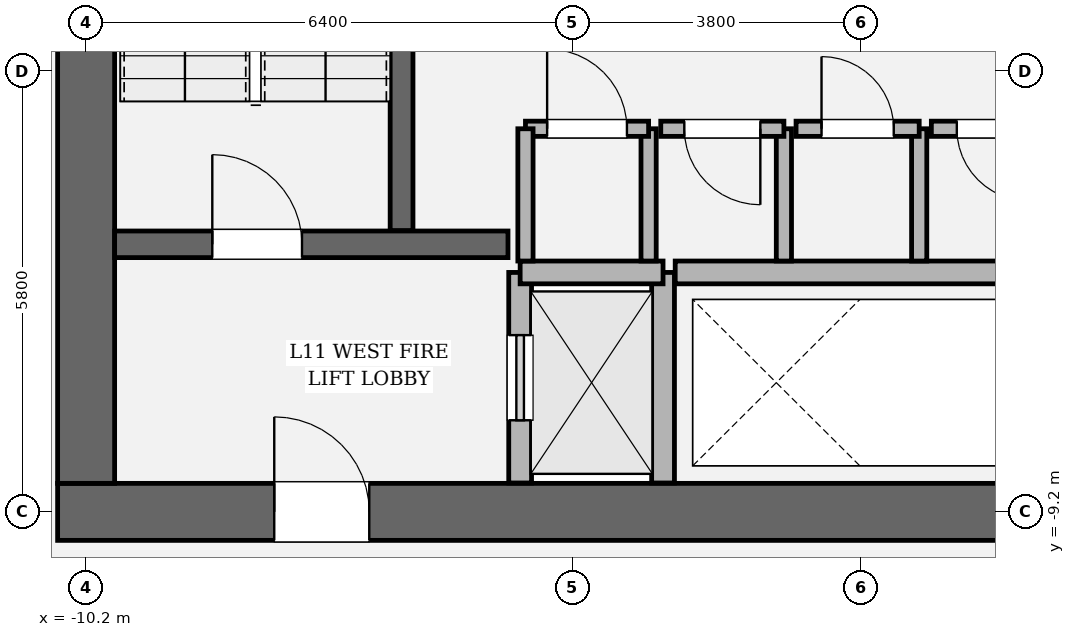
"""IFC4 building model, lengths in metres.
Left out: names, types, materials, properties, quantities, classifications, styles, units other than length and angle.
Written with IfcOpenShell. Run it as: python <this file> out.ifc"""

import sys

from ifc_helpers import new_model, si_unit, direction, frame, frame_2d, origin, place, context, subcontext, project, spatial, rectangle, extrude, element, fill, save


model = new_model("IFC4")
c1 = context("Model", 3, precision=1e-05, world=origin(), true_north=direction((0.0, 1.0)))
c2 = subcontext(c1, "Body", "Model", "MODEL_VIEW")
j1 = project(units=[si_unit("LENGTHUNIT", "METRE"), si_unit("PLANEANGLEUNIT", "RADIAN")], contexts=[c1])
p1 = place(None, origin())
s1 = spatial("IfcSite", under=j1, at=p1, CompositionType="ELEMENT")
p2 = place(p1, origin())
s2 = spatial("IfcBuilding", under=s1, at=p2, CompositionType="ELEMENT")
p3 = place(p2, frame((0.0, 0.0, 52.5)))
s3 = spatial("IfcBuildingStorey", under=s2, at=p3, CompositionType="ELEMENT", Elevation=52.5)
p4 = place(p3, frame((10.575, -9.2, 0.0), z_axis=(0.0, 0.0, 1.0), x_axis=(-1.0, 0.0, 0.0)))
e1 = element("IfcWall", 1, at=p4, inside=s3, PredefinedType="SHEAR", context=c2, shape_type="SweptSolid", body=[
    extrude(rectangle(XDim=21.15, YDim=0.75, at=frame_2d((10.575, 0.0))), origin(), (0.0, 0.0, 1.0), 4.05),
])
p5 = place(p4, frame((2.85, 0.0, 0.0)))
e2 = element("IfcOpeningElement", 2, at=p5, cuts=e1, PredefinedType="OPENING", context=c2, shape_type="SweptSolid", body=[
    extrude(rectangle(XDim=1.25, YDim=2.25, at=frame_2d((0.625, 1.125))), frame((0.0, 0.385, 0.0), z_axis=(0.0, -1.0, 0.0), x_axis=(1.0, 0.0, 0.0)), (0.0, 0.0, 1.0), 0.77),
])
p6 = place(p4, frame((17.05, 0.0, 0.0)))
e3 = element("IfcOpeningElement", 3, at=p6, cuts=e1, PredefinedType="OPENING", context=c2, shape_type="SweptSolid", body=[
    extrude(rectangle(XDim=1.25, YDim=2.25, at=frame_2d((0.625, 1.125))), frame((0.0, 0.385, 0.0), z_axis=(0.0, -1.0, 0.0), x_axis=(1.0, 0.0, 0.0)), (0.0, 0.0, 1.0), 0.77),
])
p7 = place(p3, frame((-10.2, -8.825, 0.0), z_axis=(0.0, 0.0, 1.0), x_axis=(0.0, 1.0, 0.0)))
e4 = element("IfcWall", 4, at=p7, inside=s3, PredefinedType="SHEAR", context=c2, shape_type="SweptSolid", body=[
    extrude(rectangle(XDim=17.65, YDim=0.75, at=frame_2d((8.825, 0.0))), origin(), (0.0, 0.0, 1.0), 4.05),
])
p8 = place(p7, frame((12.615, 0.0, 0.0)))
e5 = element("IfcOpeningElement", 5, at=p8, cuts=e4, PredefinedType="OPENING", context=c2, shape_type="SweptSolid", body=[
    extrude(rectangle(XDim=1.18, YDim=2.2, at=frame_2d((0.59, 1.1))), frame((0.0, 0.385, 0.0), z_axis=(0.0, -1.0, 0.0), x_axis=(1.0, 0.0, 0.0)), (0.0, 0.0, 1.0), 0.77),
])
p9 = place(p3, frame((-6.05, -5.5, 0.0), z_axis=(0.0, 0.0, 1.0), x_axis=(0.0, 1.0, 0.0)))
e6 = element("IfcWall", 6, at=p9, inside=s3, PredefinedType="SOLIDWALL", context=c2, shape_type="SweptSolid", body=[
    extrude(rectangle(XDim=8.95, YDim=0.3, at=frame_2d((4.475, 0.0))), origin(), (0.0, 0.0, 1.0), 4.05),
])
p10 = place(p3, frame((-9.825, -5.68, 0.0), z_axis=(0.0, 0.0, 1.0), x_axis=(1.0, 0.0, 0.0)))
e7 = element("IfcWall", 7, at=p10, inside=s3, PredefinedType="SOLIDWALL", context=c2, shape_type="SweptSolid", body=[
    extrude(rectangle(XDim=5.175, YDim=0.35, at=frame_2d((2.587, 0.0))), origin(), (0.0, 0.0, 1.0), 4.05),
])
p11 = place(p10, frame((1.285, 0.0, 0.0)))
e8 = element("IfcOpeningElement", 8, at=p11, cuts=e7, PredefinedType="OPENING", context=c2, shape_type="SweptSolid", body=[
    extrude(rectangle(XDim=1.18, YDim=2.2, at=frame_2d((0.59, 1.1))), frame((0.0, 0.185, 0.0), z_axis=(0.0, -1.0, 0.0), x_axis=(1.0, 0.0, 0.0)), (0.0, 0.0, 1.0), 0.37),
])
p12 = place(p3, frame((-4.49, -8.82, 0.0), z_axis=(0.0, 0.0, 1.0), x_axis=(0.0, 1.0, 0.0)))
e9 = element("IfcWall", 9, at=p12, inside=s3, PredefinedType="SOLIDWALL", context=c2, shape_type="SweptSolid", body=[
    extrude(rectangle(XDim=2.77, YDim=0.3, at=frame_2d((1.385, 0.0))), origin(), (0.0, 0.0, 1.0), 3.81),
])
p13 = place(p12, frame((0.825, 0.0, 0.0)))
e10 = element("IfcOpeningElement", 10, at=p13, cuts=e9, PredefinedType="OPENING", context=c2, shape_type="SweptSolid", body=[
    extrude(rectangle(XDim=1.12, YDim=2.25, at=frame_2d((0.56, 1.125))), frame((0.0, 0.16, 0.0), z_axis=(0.0, -1.0, 0.0), x_axis=(1.0, 0.0, 0.0)), (0.0, 0.0, 1.0), 0.32),
])
p14 = place(p3, frame((-2.61, -8.82, 0.0), z_axis=(0.0, 0.0, 1.0), x_axis=(0.0, 1.0, 0.0)))
e11 = element("IfcWall", 11, at=p14, inside=s3, PredefinedType="SOLIDWALL", context=c2, shape_type="SweptSolid", body=[
    extrude(rectangle(XDim=2.77, YDim=0.3, at=frame_2d((1.385, 0.0))), origin(), (0.0, 0.0, 1.0), 3.81),
])
p15 = place(p3, frame((-4.49, -6.05, 0.0), z_axis=(0.0, 0.0, 1.0), x_axis=(1.0, 0.0, 0.0)))
e12 = element("IfcWall", 12, at=p15, inside=s3, PredefinedType="SOLIDWALL", context=c2, shape_type="SweptSolid", body=[
    extrude(rectangle(XDim=1.88, YDim=0.3, at=frame_2d((0.94, 0.0))), origin(), (0.0, 0.0, 1.0), 3.81),
])
p16 = place(p3, frame((-2.45, -6.05, 0.0), z_axis=(0.0, 0.0, 1.0), x_axis=(1.0, 0.0, 0.0)))
e13 = element("IfcWall", 13, at=p16, inside=s3, PredefinedType="SOLIDWALL", context=c2, shape_type="SweptSolid", body=[
    extrude(rectangle(XDim=4.9, YDim=0.3, at=frame_2d((2.45, 0.0))), origin(), (0.0, 0.0, 1.0), 3.81),
])
p17 = place(p3, frame((-2.8, -5.9, 0.0), z_axis=(0.0, 0.0, 1.0), x_axis=(0.0, 1.0, 0.0)))
e14 = element("IfcWall", 14, at=p17, inside=s3, PredefinedType="SOLIDWALL", context=c2, shape_type="SweptSolid", body=[
    extrude(rectangle(XDim=1.74, YDim=0.2, at=frame_2d((0.87, 0.0))), origin(), (0.0, 0.0, 1.0), 3.81),
])
p18 = place(p3, frame((-2.8, -4.16, 0.0), z_axis=(0.0, 0.0, 1.0), x_axis=(-1.0, 0.0, 0.0)))
e15 = element("IfcWall", 15, at=p18, inside=s3, PredefinedType="SOLIDWALL", context=c2, shape_type="SweptSolid", body=[
    extrude(rectangle(XDim=1.62, YDim=0.2, at=frame_2d((0.81, 0.0))), origin(), (0.0, 0.0, 1.0), 3.81),
])
p19 = place(p18, frame((0.285, 0.0, 0.0)))
e16 = element("IfcOpeningElement", 16, at=p19, cuts=e15, PredefinedType="OPENING", context=c2, shape_type="SweptSolid", body=[
    extrude(rectangle(XDim=1.05, YDim=2.2, at=frame_2d((0.525, 1.1))), frame((0.0, 0.11, 0.0), z_axis=(0.0, -1.0, 0.0), x_axis=(1.0, 0.0, 0.0)), (0.0, 0.0, 1.0), 0.22),
])
for number, where, z_axis, x_axis in (
    (17, (-4.42, -4.16, 0.0), (0.0, 0.0, 1.0), (0.0, -1.0, 0.0)),
    (18, (-1.02, -5.9, 0.0), (0.0, 0.0, 1.0), (0.0, 1.0, 0.0)),
):
    element("IfcWall", number, at=place(p3, frame(where, z_axis=z_axis, x_axis=x_axis)), inside=s3, PredefinedType="SOLIDWALL", context=c2, shape_type="SweptSolid", body=[
        extrude(rectangle(XDim=1.74, YDim=0.2, at=frame_2d((0.87, 0.0))), origin(), (0.0, 0.0, 1.0), 3.81),
    ])
p20 = place(p3, frame((-1.02, -4.16, 0.0), z_axis=(0.0, 0.0, 1.0), x_axis=(-1.0, 0.0, 0.0)))
e19 = element("IfcWall", 19, at=p20, inside=s3, PredefinedType="SOLIDWALL", context=c2, shape_type="SweptSolid", body=[
    extrude(rectangle(XDim=1.62, YDim=0.2, at=frame_2d((0.81, 0.0))), origin(), (0.0, 0.0, 1.0), 3.81),
])
p21 = place(p20, frame((0.31, 0.0, 0.0)))
e20 = element("IfcOpeningElement", 20, at=p21, cuts=e19, PredefinedType="OPENING", context=c2, shape_type="SweptSolid", body=[
    extrude(rectangle(XDim=1.0, YDim=2.15, at=frame_2d((0.5, 1.075))), frame((0.0, 0.11, 0.0), z_axis=(0.0, -1.0, 0.0), x_axis=(1.0, 0.0, 0.0)), (0.0, 0.0, 1.0), 0.22),
])
p22 = place(p3, frame((0.76, -5.9, 0.0), z_axis=(0.0, 0.0, 1.0), x_axis=(0.0, 1.0, 0.0)))
e21 = element("IfcWall", 21, at=p22, inside=s3, PredefinedType="SOLIDWALL", context=c2, shape_type="SweptSolid", body=[
    extrude(rectangle(XDim=1.74, YDim=0.2, at=frame_2d((0.87, 0.0))), origin(), (0.0, 0.0, 1.0), 3.81),
])
p23 = place(p3, frame((0.76, -4.16, 0.0), z_axis=(0.0, 0.0, 1.0), x_axis=(-1.0, 0.0, 0.0)))
e22 = element("IfcWall", 22, at=p23, inside=s3, PredefinedType="SOLIDWALL", context=c2, shape_type="SweptSolid", body=[
    extrude(rectangle(XDim=1.62, YDim=0.2, at=frame_2d((0.81, 0.0))), origin(), (0.0, 0.0, 1.0), 3.81),
])
p24 = place(p23, frame((0.335, 0.0, 0.0)))
e23 = element("IfcOpeningElement", 23, at=p24, cuts=e22, PredefinedType="OPENING", context=c2, shape_type="SweptSolid", body=[
    extrude(rectangle(XDim=0.95, YDim=2.15, at=frame_2d((0.475, 1.075))), frame((0.0, 0.11, 0.0), z_axis=(0.0, -1.0, 0.0), x_axis=(1.0, 0.0, 0.0)), (0.0, 0.0, 1.0), 0.22),
])
p25 = place(p3, frame((2.54, -4.16, 0.0), z_axis=(0.0, 0.0, 1.0), x_axis=(-1.0, 0.0, 0.0)))
e24 = element("IfcWall", 24, at=p25, inside=s3, PredefinedType="SOLIDWALL", context=c2, shape_type="SweptSolid", body=[
    extrude(rectangle(XDim=1.62, YDim=0.2, at=frame_2d((0.81, 0.0))), origin(), (0.0, 0.0, 1.0), 3.81),
])
p26 = place(p25, frame((0.335, 0.0, 0.0)))
e25 = element("IfcOpeningElement", 25, at=p26, cuts=e24, PredefinedType="OPENING", context=c2, shape_type="SweptSolid", body=[
    extrude(rectangle(XDim=0.95, YDim=2.15, at=frame_2d((0.475, 1.075))), frame((0.0, 0.11, 0.0), z_axis=(0.0, -1.0, 0.0), x_axis=(1.0, 0.0, 0.0)), (0.0, 0.0, 1.0), 0.22),
])
p27 = place(p11, origin())
e26 = element("IfcDoor", 26, at=p27, inside=s3, OperationType="SINGLE_SWING_LEFT", PredefinedType="DOOR", context=c2, shape_type="SweptSolid", body=[
    extrude(rectangle(XDim=1.18, YDim=2.2, at=frame_2d((0.59, 1.1))), frame((0.0, 0.025, 0.0), z_axis=(0.0, -1.0, 0.0), x_axis=(1.0, 0.0, 0.0)), (0.0, 0.0, 1.0), 0.05),
])
fill(e8, e26)
p28 = place(p6, origin())
e27 = element("IfcDoor", 27, at=p28, inside=s3, OperationType="SINGLE_SWING_RIGHT", PredefinedType="DOOR", context=c2, shape_type="SweptSolid", body=[
    extrude(rectangle(XDim=1.25, YDim=2.25, at=frame_2d((0.625, 1.125))), frame((0.0, 0.025, 0.0), z_axis=(0.0, -1.0, 0.0), x_axis=(1.0, 0.0, 0.0)), (0.0, 0.0, 1.0), 0.05),
])
fill(e3, e27)
p29 = place(p13, origin())
e28 = element("IfcDoor", 28, at=p29, inside=s3, OperationType="SLIDING_TO_LEFT", PredefinedType="DOOR", context=c2, shape_type="SweptSolid", body=[
    extrude(rectangle(XDim=1.12, YDim=2.25, at=frame_2d((0.56, 1.125))), frame((0.0, 0.025, 0.0), z_axis=(0.0, -1.0, 0.0), x_axis=(1.0, 0.0, 0.0)), (0.0, 0.0, 1.0), 0.05),
])
fill(e10, e28)
p30 = place(p19, origin())
e29 = element("IfcDoor", 29, at=p30, inside=s3, OperationType="SINGLE_SWING_RIGHT", PredefinedType="DOOR", context=c2, shape_type="SweptSolid", body=[
    extrude(rectangle(XDim=1.05, YDim=2.2, at=frame_2d((0.525, 1.1))), frame((0.0, 0.025, 0.0), z_axis=(0.0, -1.0, 0.0), x_axis=(1.0, 0.0, 0.0)), (0.0, 0.0, 1.0), 0.05),
])
fill(e16, e29)
p31 = place(p21, origin())
e30 = element("IfcDoor", 30, at=p31, inside=s3, OperationType="SINGLE_SWING_LEFT", PredefinedType="DOOR", context=c2, shape_type="SweptSolid", body=[
    extrude(rectangle(XDim=1.0, YDim=2.15, at=frame_2d((0.5, 1.075))), frame((0.0, 0.025, 0.0), z_axis=(0.0, -1.0, 0.0), x_axis=(1.0, 0.0, 0.0)), (0.0, 0.0, 1.0), 0.05),
])
fill(e20, e30)
p32 = place(p24, origin())
e31 = element("IfcDoor", 31, at=p32, inside=s3, OperationType="SINGLE_SWING_RIGHT", PredefinedType="DOOR", context=c2, shape_type="SweptSolid", body=[
    extrude(rectangle(XDim=0.95, YDim=2.15, at=frame_2d((0.475, 1.075))), frame((0.0, 0.025, 0.0), z_axis=(0.0, -1.0, 0.0), x_axis=(1.0, 0.0, 0.0)), (0.0, 0.0, 1.0), 0.05),
])
fill(e23, e31)
p33 = place(p26, origin())
e32 = element("IfcDoor", 32, at=p33, inside=s3, OperationType="SINGLE_SWING_LEFT", PredefinedType="DOOR", context=c2, shape_type="SweptSolid", body=[
    extrude(rectangle(XDim=0.95, YDim=2.15, at=frame_2d((0.475, 1.075))), frame((0.0, 0.025, 0.0), z_axis=(0.0, -1.0, 0.0), x_axis=(1.0, 0.0, 0.0)), (0.0, 0.0, 1.0), 0.05),
])
fill(e25, e32)
save(model, sys.argv[1])
